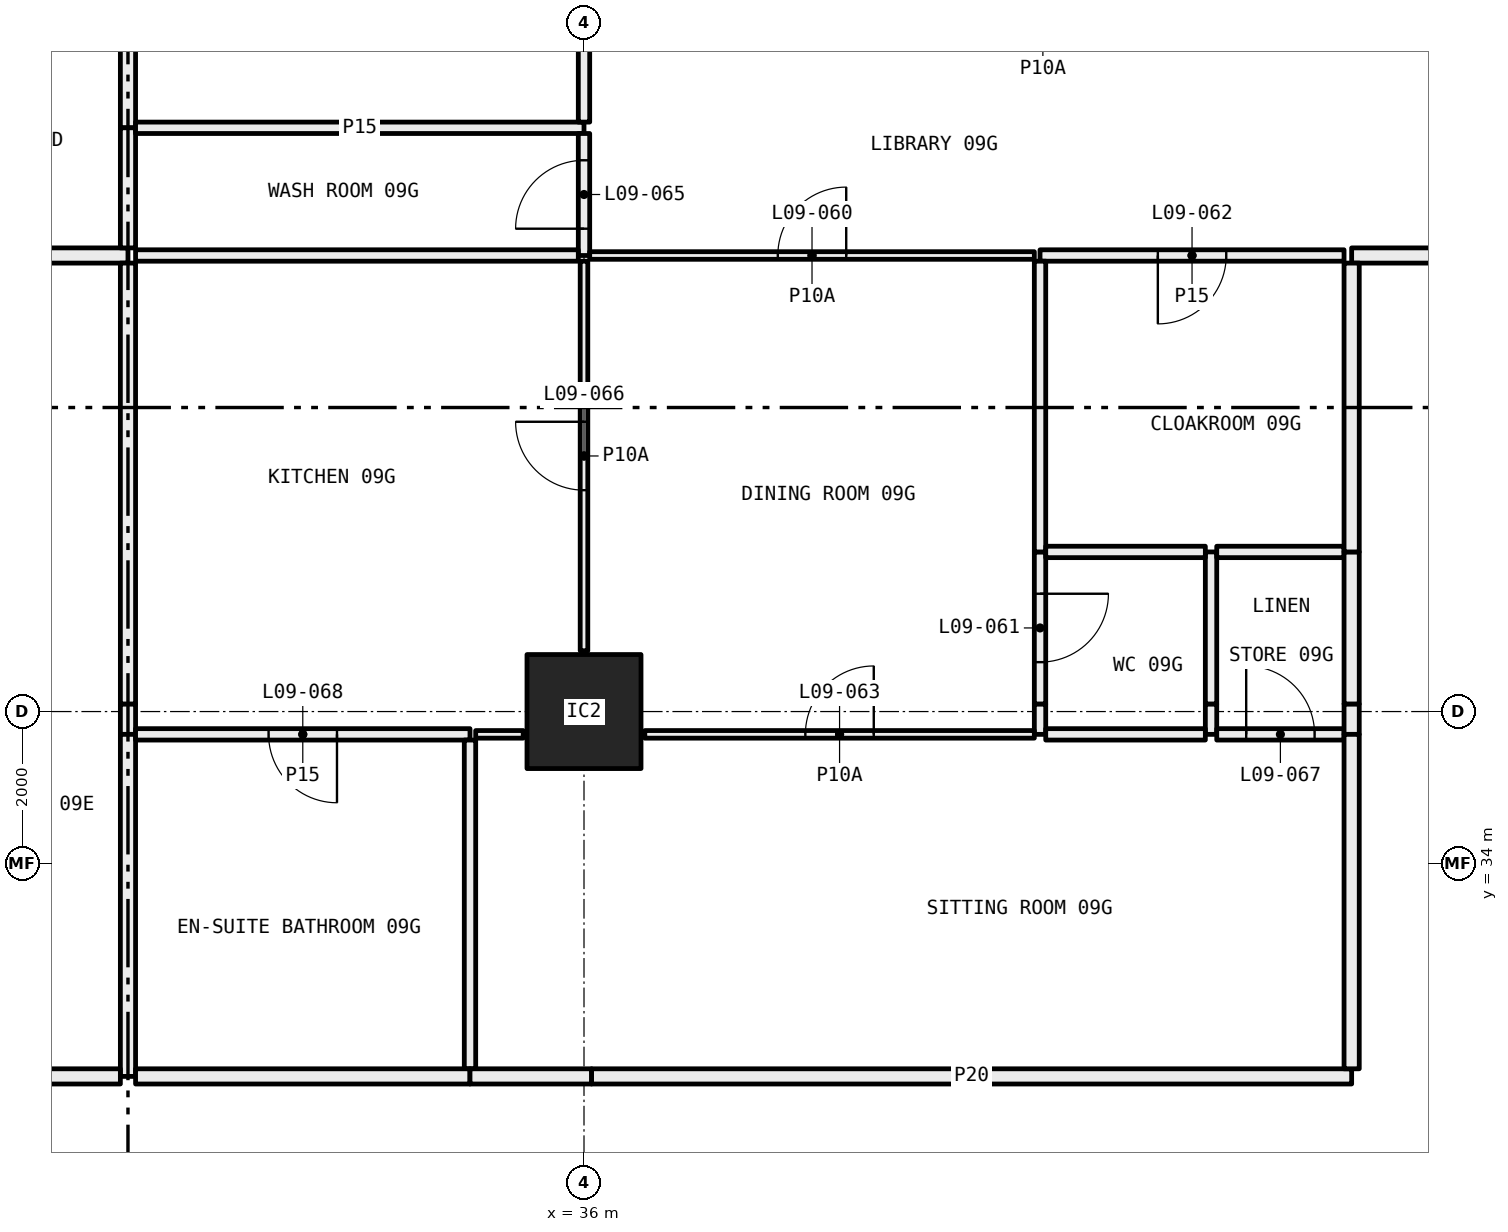
"""IFC4 building model, lengths in metres.
Left out: names, types, materials, properties, quantities, classifications, styles, units other than length and angle.
Written with IfcOpenShell. Run it as: python <this file> out.ifc"""

import sys

from ifc_helpers import new_model, si_unit, direction, frame, frame_2d, origin, origin_2d, place, context, subcontext, project, spatial, rectangle, hollow_rectangle, extrude, element, fill, save


model = new_model("IFC4")
c1 = context("Model", 3, precision=1e-05, world=origin(), true_north=direction((0.0, 1.0)))
c2 = subcontext(c1, "Body", "Model", "MODEL_VIEW")
j1 = project(units=[si_unit("LENGTHUNIT", "METRE"), si_unit("PLANEANGLEUNIT", "RADIAN")], contexts=[c1])
p1 = place(None, origin())
s1 = spatial("IfcSite", under=j1, at=p1, CompositionType="ELEMENT")
p2 = place(p1, origin())
s2 = spatial("IfcBuilding", under=s1, at=p2, CompositionType="ELEMENT")
p3 = place(p2, frame((0.0, 0.0, 43.8)))
s3 = spatial("IfcBuildingStorey", under=s2, at=p3, CompositionType="ELEMENT", Elevation=43.8)
p4 = place(p3, frame((36.0, 36.0, 0.0), z_axis=(0.0, 0.0, 1.0), x_axis=(1.0, 0.0, 0.0)))
e1 = element("IfcColumn", 1, at=p4, inside=s3, PredefinedType="COLUMN", context=c2, shape_type="SweptSolid", body=[
    extrude(hollow_rectangle(XDim=1.5, YDim=1.5, WallThickness=0.065, at=origin_2d()), origin(), (0.0, 0.0, 1.0), 3.05),
])
p5 = place(p3, frame((25.9, 42.0, 0.0), z_axis=(0.0, 0.0, 1.0), x_axis=(1.0, 0.0, 0.0)))
e2 = element("IfcWall", 2, at=p5, inside=s3, PredefinedType="PARTITIONING", context=c2, shape_type="SweptSolid", body=[
    extrude(rectangle(XDim=4.1, YDim=0.2, at=frame_2d((2.05, 0.0))), origin(), (0.0, 0.0, 1.0), 3.05),
])
p6 = place(p3, frame((30.0, 43.68, 0.0), z_axis=(0.0, 0.0, 1.0), x_axis=(0.0, 1.0, 0.0)))
e3 = element("IfcWall", 3, at=p6, inside=s3, PredefinedType="PARTITIONING", context=c2, shape_type="SweptSolid", body=[
    extrude(rectangle(XDim=1.32, YDim=0.2, at=frame_2d((0.66, 0.0))), origin(), (0.0, 0.0, 1.0), 3.05),
])
p7 = place(p3, frame((30.0, 42.1, 0.0), z_axis=(0.0, 0.0, 1.0), x_axis=(0.0, 1.0, 0.0)))
e4 = element("IfcWall", 4, at=p7, inside=s3, PredefinedType="PARTITIONING", context=c2, shape_type="SweptSolid", body=[
    extrude(rectangle(XDim=1.58, YDim=0.2, at=frame_2d((0.79, 0.0))), origin(), (0.0, 0.0, 1.0), 3.05),
])
p8 = place(p3, frame((30.0, 35.7, 0.0), z_axis=(0.0, 0.0, 1.0), x_axis=(0.0, 1.0, 0.0)))
e5 = element("IfcWall", 5, at=p8, inside=s3, PredefinedType="PARTITIONING", context=c2, shape_type="SweptSolid", body=[
    extrude(rectangle(XDim=0.4, YDim=0.2, at=frame_2d((0.2, 0.0))), origin(), (0.0, 0.0, 1.0), 2.45),
])
p9 = place(p3, frame((30.0, 36.1, 0.0), z_axis=(0.0, 0.0, 1.0), x_axis=(0.0, 1.0, 0.0)))
e6 = element("IfcWall", 6, at=p9, inside=s3, PredefinedType="PARTITIONING", context=c2, shape_type="SweptSolid", body=[
    extrude(rectangle(XDim=5.8, YDim=0.2, at=frame_2d((2.9, 0.0))), origin(), (0.0, 0.0, 1.0), 3.05),
])
p10 = place(p3, frame((30.0, 31.2, 0.0), z_axis=(0.0, 0.0, 1.0), x_axis=(0.0, 1.0, 0.0)))
e7 = element("IfcWall", 7, at=p10, inside=s3, PredefinedType="PARTITIONING", context=c2, shape_type="SweptSolid", body=[
    extrude(rectangle(XDim=4.5, YDim=0.2, at=frame_2d((2.25, 0.0))), origin(), (0.0, 0.0, 1.0), 3.05),
])
p11 = place(p3, frame((26.0, 31.2, 0.0), z_axis=(0.0, 0.0, 1.0), x_axis=(1.0, 0.0, 0.0)))
e8 = element("IfcWall", 8, at=p11, inside=s3, PredefinedType="PARTITIONING", context=c2, shape_type="SweptSolid", body=[
    extrude(rectangle(XDim=3.9, YDim=0.2, at=frame_2d((1.95, 0.0))), origin(), (0.0, 0.0, 1.0), 3.05),
])
p12 = place(p3, frame((30.1, 43.68, 0.0), z_axis=(0.0, 0.0, 1.0), x_axis=(1.0, 0.0, 0.0)))
e9 = element("IfcWall", 9, at=p12, inside=s3, PredefinedType="PARTITIONING", context=c2, shape_type="SweptSolid", body=[
    extrude(rectangle(XDim=5.9, YDim=0.15, at=frame_2d((2.95, 0.0))), origin(), (0.0, 0.0, 1.0), 2.45),
])
p13 = place(p3, frame((36.0, 43.755, 0.0), z_axis=(0.0, 0.0, 1.0), x_axis=(0.0, 1.0, 0.0)))
e10 = element("IfcWall", 10, at=p13, inside=s3, PredefinedType="PARTITIONING", context=c2, shape_type="SweptSolid", body=[
    extrude(rectangle(XDim=1.245, YDim=0.15, at=frame_2d((0.623, 0.0))), origin(), (0.0, 0.0, 1.0), 2.45),
])
p14 = place(p3, frame((36.0, 42.0, 0.0), z_axis=(0.0, 0.0, 1.0), x_axis=(0.0, 1.0, 0.0)))
e11 = element("IfcWall", 11, at=p14, inside=s3, PredefinedType="PARTITIONING", context=c2, shape_type="SweptSolid", body=[
    extrude(rectangle(XDim=1.605, YDim=0.15, at=frame_2d((0.802, 0.0))), origin(), (0.0, 0.0, 1.0), 2.45),
])
p15 = place(p14, frame((0.353, 0.0, 0.0)))
e12 = element("IfcOpeningElement", 12, at=p15, cuts=e11, PredefinedType="OPENING", context=c2, shape_type="SweptSolid", body=[
    extrude(rectangle(XDim=0.9, YDim=2.1, at=frame_2d((0.45, 1.05))), frame((0.0, 0.085, 0.0), z_axis=(0.0, -1.0, 0.0), x_axis=(1.0, 0.0, 0.0)), (0.0, 0.0, 1.0), 0.17),
])
p16 = place(p3, frame((30.1, 42.0, 0.0), z_axis=(0.0, 0.0, 1.0), x_axis=(1.0, 0.0, 0.0)))
e13 = element("IfcWall", 13, at=p16, inside=s3, PredefinedType="PARTITIONING", context=c2, shape_type="SweptSolid", body=[
    extrude(rectangle(XDim=5.825, YDim=0.15, at=frame_2d((2.913, 0.0))), origin(), (0.0, 0.0, 1.0), 2.45),
])
p17 = place(p3, frame((36.075, 42.0, 0.0), z_axis=(0.0, 0.0, 1.0), x_axis=(1.0, 0.0, 0.0)))
e14 = element("IfcWall", 14, at=p17, inside=s3, PredefinedType="PARTITIONING", context=c2, shape_type="SweptSolid", body=[
    extrude(rectangle(XDim=5.85, YDim=0.1, at=frame_2d((2.925, 0.0))), origin(), (0.0, 0.0, 1.0), 2.45),
])
p18 = place(p17, frame((2.475, 0.0, 0.0)))
e15 = element("IfcOpeningElement", 15, at=p18, cuts=e14, PredefinedType="OPENING", context=c2, shape_type="SweptSolid", body=[
    extrude(rectangle(XDim=0.9, YDim=2.1, at=frame_2d((0.45, 1.05))), frame((0.0, 0.06, 0.0), z_axis=(0.0, -1.0, 0.0), x_axis=(1.0, 0.0, 0.0)), (0.0, 0.0, 1.0), 0.12),
])
p19 = place(p3, frame((42.0, 42.0, 0.0), z_axis=(0.0, 0.0, 1.0), x_axis=(1.0, 0.0, 0.0)))
e16 = element("IfcWall", 16, at=p19, inside=s3, PredefinedType="PARTITIONING", context=c2, shape_type="SweptSolid", body=[
    extrude(rectangle(XDim=4.0, YDim=0.15, at=frame_2d((2.0, 0.0))), origin(), (0.0, 0.0, 1.0), 3.05),
])
p20 = place(p19, frame((1.55, 0.0, 0.0)))
e17 = element("IfcOpeningElement", 17, at=p20, cuts=e16, PredefinedType="OPENING", context=c2, shape_type="SweptSolid", body=[
    extrude(rectangle(XDim=0.9, YDim=2.1, at=frame_2d((0.45, 1.05))), frame((0.0, 0.085, 0.0), z_axis=(0.0, -1.0, 0.0), x_axis=(1.0, 0.0, 0.0)), (0.0, 0.0, 1.0), 0.17),
])
p21 = place(p3, frame((46.1, 42.0, 0.0), z_axis=(0.0, 0.0, 1.0), x_axis=(1.0, 0.0, 0.0)))
e18 = element("IfcWall", 18, at=p21, inside=s3, PredefinedType="PARTITIONING", context=c2, shape_type="SweptSolid", body=[
    extrude(rectangle(XDim=1.9, YDim=0.2, at=frame_2d((0.95, 0.0))), origin(), (0.0, 0.0, 1.0), 3.05),
])
p22 = place(p3, frame((36.0, 36.8, 0.0), z_axis=(0.0, 0.0, 1.0), x_axis=(0.0, 1.0, 0.0)))
e19 = element("IfcWall", 19, at=p22, inside=s3, PredefinedType="PARTITIONING", context=c2, shape_type="SweptSolid", body=[
    extrude(rectangle(XDim=5.125, YDim=0.1, at=frame_2d((2.562, 0.0))), origin(), (0.0, 0.0, 1.0), 2.45),
])
p23 = place(p22, frame((2.113, 0.0, 0.0)))
e20 = element("IfcOpeningElement", 20, at=p23, cuts=e19, PredefinedType="OPENING", context=c2, shape_type="SweptSolid", body=[
    extrude(rectangle(XDim=0.9, YDim=2.1, at=frame_2d((0.45, 1.05))), frame((0.0, 0.06, 0.0), z_axis=(0.0, -1.0, 0.0), x_axis=(1.0, 0.0, 0.0)), (0.0, 0.0, 1.0), 0.12),
])
p24 = place(p3, frame((30.1, 35.7, 0.0), z_axis=(0.0, 0.0, 1.0), x_axis=(1.0, 0.0, 0.0)))
e21 = element("IfcWall", 21, at=p24, inside=s3, PredefinedType="PARTITIONING", context=c2, shape_type="SweptSolid", body=[
    extrude(rectangle(XDim=4.4, YDim=0.15, at=frame_2d((2.2, 0.0))), origin(), (0.0, 0.0, 1.0), 3.05),
])
p25 = place(p24, frame((1.75, 0.0, 0.0)))
e22 = element("IfcOpeningElement", 22, at=p25, cuts=e21, PredefinedType="OPENING", context=c2, shape_type="SweptSolid", body=[
    extrude(rectangle(XDim=0.9, YDim=2.1, at=frame_2d((0.45, 1.05))), frame((0.0, 0.085, 0.0), z_axis=(0.0, -1.0, 0.0), x_axis=(1.0, 0.0, 0.0)), (0.0, 0.0, 1.0), 0.17),
])
p26 = place(p3, frame((34.575, 35.7, 0.0), z_axis=(0.0, 0.0, 1.0), x_axis=(1.0, 0.0, 0.0)))
e23 = element("IfcWall", 23, at=p26, inside=s3, PredefinedType="PARTITIONING", context=c2, shape_type="SweptSolid", body=[
    extrude(rectangle(XDim=0.625, YDim=0.1, at=frame_2d((0.312, 0.0))), origin(), (0.0, 0.0, 1.0), 3.05),
])
p27 = place(p3, frame((42.0, 35.7, 0.0), z_axis=(0.0, 0.0, 1.0), x_axis=(0.0, 1.0, 0.0)))
e24 = element("IfcWall", 24, at=p27, inside=s3, PredefinedType="PARTITIONING", context=c2, shape_type="SweptSolid", body=[
    extrude(rectangle(XDim=0.4, YDim=0.15, at=frame_2d((0.2, 0.0))), origin(), (0.0, 0.0, 1.0), 2.45),
])
p28 = place(p3, frame((42.0, 36.1, 0.0), z_axis=(0.0, 0.0, 1.0), x_axis=(0.0, 1.0, 0.0)))
e25 = element("IfcWall", 25, at=p28, inside=s3, PredefinedType="PARTITIONING", context=c2, shape_type="SweptSolid", body=[
    extrude(rectangle(XDim=2.0, YDim=0.15, at=frame_2d((1.0, 0.0))), origin(), (0.0, 0.0, 1.0), 3.05),
])
p29 = place(p28, frame((0.55, 0.0, 0.0)))
e26 = element("IfcOpeningElement", 26, at=p29, cuts=e25, PredefinedType="OPENING", context=c2, shape_type="SweptSolid", body=[
    extrude(rectangle(XDim=0.9, YDim=2.1, at=frame_2d((0.45, 1.05))), frame((0.0, 0.085, 0.0), z_axis=(0.0, -1.0, 0.0), x_axis=(1.0, 0.0, 0.0)), (0.0, 0.0, 1.0), 0.17),
])
p30 = place(p3, frame((42.0, 38.1, 0.0), z_axis=(0.0, 0.0, 1.0), x_axis=(0.0, 1.0, 0.0)))
e27 = element("IfcWall", 27, at=p30, inside=s3, PredefinedType="PARTITIONING", context=c2, shape_type="SweptSolid", body=[
    extrude(rectangle(XDim=3.825, YDim=0.15, at=frame_2d((1.913, 0.0))), origin(), (0.0, 0.0, 1.0), 3.05),
])
p31 = place(p3, frame((36.8, 35.7, 0.0), z_axis=(0.0, 0.0, 1.0), x_axis=(1.0, 0.0, 0.0)))
e28 = element("IfcWall", 28, at=p31, inside=s3, PredefinedType="PARTITIONING", context=c2, shape_type="SweptSolid", body=[
    extrude(rectangle(XDim=5.125, YDim=0.1, at=frame_2d((2.562, 0.0))), origin(), (0.0, 0.0, 1.0), 3.05),
])
p32 = place(p31, frame((2.113, 0.0, 0.0)))
e29 = element("IfcOpeningElement", 29, at=p32, cuts=e28, PredefinedType="OPENING", context=c2, shape_type="SweptSolid", body=[
    extrude(rectangle(XDim=0.9, YDim=2.1, at=frame_2d((0.45, 1.05))), frame((0.0, 0.06, 0.0), z_axis=(0.0, -1.0, 0.0), x_axis=(1.0, 0.0, 0.0)), (0.0, 0.0, 1.0), 0.12),
])
p33 = place(p3, frame((44.25, 35.7, 0.0), z_axis=(0.0, 0.0, 1.0), x_axis=(0.0, 1.0, 0.0)))
e30 = element("IfcWall", 30, at=p33, inside=s3, PredefinedType="PARTITIONING", context=c2, shape_type="SweptSolid", body=[
    extrude(rectangle(XDim=0.4, YDim=0.15, at=frame_2d((0.2, 0.0))), origin(), (0.0, 0.0, 1.0), 2.45),
])
p34 = place(p3, frame((44.25, 36.1, 0.0), z_axis=(0.0, 0.0, 1.0), x_axis=(0.0, 1.0, 0.0)))
e31 = element("IfcWall", 31, at=p34, inside=s3, PredefinedType="PARTITIONING", context=c2, shape_type="SweptSolid", body=[
    extrude(rectangle(XDim=2.0, YDim=0.15, at=frame_2d((1.0, 0.0))), origin(), (0.0, 0.0, 1.0), 3.05),
])
for number, where, z_axis, x_axis in (
    (32, (44.175, 38.1, 0.0), (0.0, 0.0, 1.0), (-1.0, 0.0, 0.0)),
    (33, (42.075, 35.7, 0.0), (0.0, 0.0, 1.0), (1.0, 0.0, 0.0)),
):
    element("IfcWall", number, at=place(p3, frame(where, z_axis=z_axis, x_axis=x_axis)), inside=s3, PredefinedType="PARTITIONING", context=c2, shape_type="SweptSolid", body=[
        extrude(rectangle(XDim=2.1, YDim=0.15, at=frame_2d((1.05, 0.0))), origin(), (0.0, 0.0, 1.0), 3.05),
    ])
p35 = place(p3, frame((46.0, 38.1, 0.0), z_axis=(0.0, 0.0, 1.0), x_axis=(-1.0, 0.0, 0.0)))
e34 = element("IfcWall", 34, at=p35, inside=s3, PredefinedType="PARTITIONING", context=c2, shape_type="SweptSolid", body=[
    extrude(rectangle(XDim=1.675, YDim=0.15, at=frame_2d((0.837, 0.0))), origin(), (0.0, 0.0, 1.0), 3.05),
])
p36 = place(p3, frame((44.325, 35.7, 0.0), z_axis=(0.0, 0.0, 1.0), x_axis=(1.0, 0.0, 0.0)))
e35 = element("IfcWall", 35, at=p36, inside=s3, PredefinedType="PARTITIONING", context=c2, shape_type="SweptSolid", body=[
    extrude(rectangle(XDim=1.675, YDim=0.15, at=frame_2d((0.837, 0.0))), origin(), (0.0, 0.0, 1.0), 3.05),
])
p37 = place(p36, frame((0.387, 0.0, 0.0)))
e36 = element("IfcOpeningElement", 36, at=p37, cuts=e35, PredefinedType="OPENING", context=c2, shape_type="SweptSolid", body=[
    extrude(rectangle(XDim=0.9, YDim=2.1, at=frame_2d((0.45, 1.05))), frame((0.0, 0.085, 0.0), z_axis=(0.0, -1.0, 0.0), x_axis=(1.0, 0.0, 0.0)), (0.0, 0.0, 1.0), 0.17),
])
p38 = place(p3, frame((46.1, 35.7, 0.0), z_axis=(0.0, 0.0, 1.0), x_axis=(0.0, 1.0, 0.0)))
e37 = element("IfcWall", 37, at=p38, inside=s3, PredefinedType="PARTITIONING", context=c2, shape_type="SweptSolid", body=[
    extrude(rectangle(XDim=0.4, YDim=0.2, at=frame_2d((0.2, 0.0))), origin(), (0.0, 0.0, 1.0), 2.45),
])
p39 = place(p3, frame((46.1, 36.1, 0.0), z_axis=(0.0, 0.0, 1.0), x_axis=(0.0, 1.0, 0.0)))
e38 = element("IfcWall", 38, at=p39, inside=s3, PredefinedType="PARTITIONING", context=c2, shape_type="SweptSolid", body=[
    extrude(rectangle(XDim=2.0, YDim=0.2, at=frame_2d((1.0, 0.0))), origin(), (0.0, 0.0, 1.0), 3.05),
])
p40 = place(p3, frame((46.1, 38.1, 0.0), z_axis=(0.0, 0.0, 1.0), x_axis=(0.0, 1.0, 0.0)))
e39 = element("IfcWall", 39, at=p40, inside=s3, PredefinedType="PARTITIONING", context=c2, shape_type="SweptSolid", body=[
    extrude(rectangle(XDim=3.8, YDim=0.2, at=frame_2d((1.9, 0.0))), origin(), (0.0, 0.0, 1.0), 3.05),
])
p41 = place(p3, frame((34.5, 31.3, 0.0), z_axis=(0.0, 0.0, 1.0), x_axis=(0.0, 1.0, 0.0)))
e40 = element("IfcWall", 40, at=p41, inside=s3, PredefinedType="PARTITIONING", context=c2, shape_type="SweptSolid", body=[
    extrude(rectangle(XDim=4.325, YDim=0.15, at=frame_2d((2.163, 0.0))), origin(), (0.0, 0.0, 1.0), 3.05),
])
p42 = place(p3, frame((30.1, 31.2, 0.0), z_axis=(0.0, 0.0, 1.0), x_axis=(1.0, 0.0, 0.0)))
e41 = element("IfcWall", 41, at=p42, inside=s3, PredefinedType="PARTITIONING", context=c2, shape_type="SweptSolid", body=[
    extrude(rectangle(XDim=4.4, YDim=0.2, at=frame_2d((2.2, 0.0))), origin(), (0.0, 0.0, 1.0), 3.05),
])
p43 = place(p3, frame((34.5, 31.2, 0.0), z_axis=(0.0, 0.0, 1.0), x_axis=(1.0, 0.0, 0.0)))
e42 = element("IfcWall", 42, at=p43, inside=s3, PredefinedType="PARTITIONING", context=c2, shape_type="SweptSolid", body=[
    extrude(rectangle(XDim=1.6, YDim=0.2, at=frame_2d((0.8, 0.0))), origin(), (0.0, 0.0, 1.0), 2.45),
])
p44 = place(p3, frame((36.1, 31.2, 0.0), z_axis=(0.0, 0.0, 1.0), x_axis=(1.0, 0.0, 0.0)))
e43 = element("IfcWall", 43, at=p44, inside=s3, PredefinedType="PARTITIONING", context=c2, shape_type="SweptSolid", body=[
    extrude(rectangle(XDim=10.0, YDim=0.2, at=frame_2d((5.0, 0.0))), origin(), (0.0, 0.0, 1.0), 3.05),
])
p45 = place(p3, frame((46.1, 31.3, 0.0), z_axis=(0.0, 0.0, 1.0), x_axis=(0.0, 1.0, 0.0)))
e44 = element("IfcWall", 44, at=p45, inside=s3, PredefinedType="PARTITIONING", context=c2, shape_type="SweptSolid", body=[
    extrude(rectangle(XDim=4.4, YDim=0.2, at=frame_2d((2.2, 0.0))), origin(), (0.0, 0.0, 1.0), 3.05),
])
p46 = place(p18, origin())
e45 = element("IfcDoor", 45, at=p46, inside=s3, OperationType="SINGLE_SWING_LEFT", PredefinedType="DOOR", context=c2, shape_type="SweptSolid", body=[
    extrude(rectangle(XDim=0.9, YDim=2.1, at=frame_2d((0.45, 1.05))), frame((0.0, 0.025, 0.0), z_axis=(0.0, -1.0, 0.0), x_axis=(1.0, 0.0, 0.0)), (0.0, 0.0, 1.0), 0.05),
])
fill(e15, e45)
p47 = place(p29, frame((0.9, 0.0, 0.0), x_axis=(-1.0, 0.0, 0.0)))
e46 = element("IfcDoor", 46, at=p47, inside=s3, OperationType="SINGLE_SWING_RIGHT", PredefinedType="DOOR", context=c2, shape_type="SweptSolid", body=[
    extrude(rectangle(XDim=0.9, YDim=2.1, at=frame_2d((0.45, 1.05))), frame((0.0, 0.025, 0.0), z_axis=(0.0, -1.0, 0.0), x_axis=(1.0, 0.0, 0.0)), (0.0, 0.0, 1.0), 0.05),
])
fill(e26, e46)
p48 = place(p20, frame((0.9, 0.0, 0.0), x_axis=(-1.0, 0.0, 0.0)))
e47 = element("IfcDoor", 47, at=p48, inside=s3, OperationType="SINGLE_SWING_LEFT", PredefinedType="DOOR", context=c2, shape_type="SweptSolid", body=[
    extrude(rectangle(XDim=0.9, YDim=2.1, at=frame_2d((0.45, 1.05))), frame((0.0, 0.025, 0.0), z_axis=(0.0, -1.0, 0.0), x_axis=(1.0, 0.0, 0.0)), (0.0, 0.0, 1.0), 0.05),
])
fill(e17, e47)
p49 = place(p32, origin())
e48 = element("IfcDoor", 48, at=p49, inside=s3, OperationType="SINGLE_SWING_LEFT", PredefinedType="DOOR", context=c2, shape_type="SweptSolid", body=[
    extrude(rectangle(XDim=0.9, YDim=2.1, at=frame_2d((0.45, 1.05))), frame((0.0, 0.025, 0.0), z_axis=(0.0, -1.0, 0.0), x_axis=(1.0, 0.0, 0.0)), (0.0, 0.0, 1.0), 0.05),
])
fill(e29, e48)
p50 = place(p15, origin())
e49 = element("IfcDoor", 49, at=p50, inside=s3, OperationType="SINGLE_SWING_RIGHT", PredefinedType="DOOR", context=c2, shape_type="SweptSolid", body=[
    extrude(rectangle(XDim=0.9, YDim=2.1, at=frame_2d((0.45, 1.05))), frame((0.0, 0.025, 0.0), z_axis=(0.0, -1.0, 0.0), x_axis=(1.0, 0.0, 0.0)), (0.0, 0.0, 1.0), 0.05),
])
fill(e12, e49)
p51 = place(p23, origin())
e50 = element("IfcDoor", 50, at=p51, inside=s3, OperationType="SINGLE_SWING_LEFT", PredefinedType="DOOR", context=c2, shape_type="SweptSolid", body=[
    extrude(rectangle(XDim=0.9, YDim=2.1, at=frame_2d((0.45, 1.05))), frame((0.0, 0.025, 0.0), z_axis=(0.0, -1.0, 0.0), x_axis=(1.0, 0.0, 0.0)), (0.0, 0.0, 1.0), 0.05),
])
fill(e20, e50)
p52 = place(p37, origin())
e51 = element("IfcDoor", 51, at=p52, inside=s3, OperationType="SINGLE_SWING_RIGHT", PredefinedType="DOOR", context=c2, shape_type="SweptSolid", body=[
    extrude(rectangle(XDim=0.9, YDim=2.1, at=frame_2d((0.45, 1.05))), frame((0.0, 0.025, 0.0), z_axis=(0.0, -1.0, 0.0), x_axis=(1.0, 0.0, 0.0)), (0.0, 0.0, 1.0), 0.05),
])
fill(e36, e51)
p53 = place(p25, frame((0.9, 0.0, 0.0), x_axis=(-1.0, 0.0, 0.0)))
e52 = element("IfcDoor", 52, at=p53, inside=s3, OperationType="SINGLE_SWING_RIGHT", PredefinedType="DOOR", context=c2, shape_type="SweptSolid", body=[
    extrude(rectangle(XDim=0.9, YDim=2.1, at=frame_2d((0.45, 1.05))), frame((0.0, 0.025, 0.0), z_axis=(0.0, -1.0, 0.0), x_axis=(1.0, 0.0, 0.0)), (0.0, 0.0, 1.0), 0.05),
])
fill(e22, e52)
save(model, sys.argv[1])
